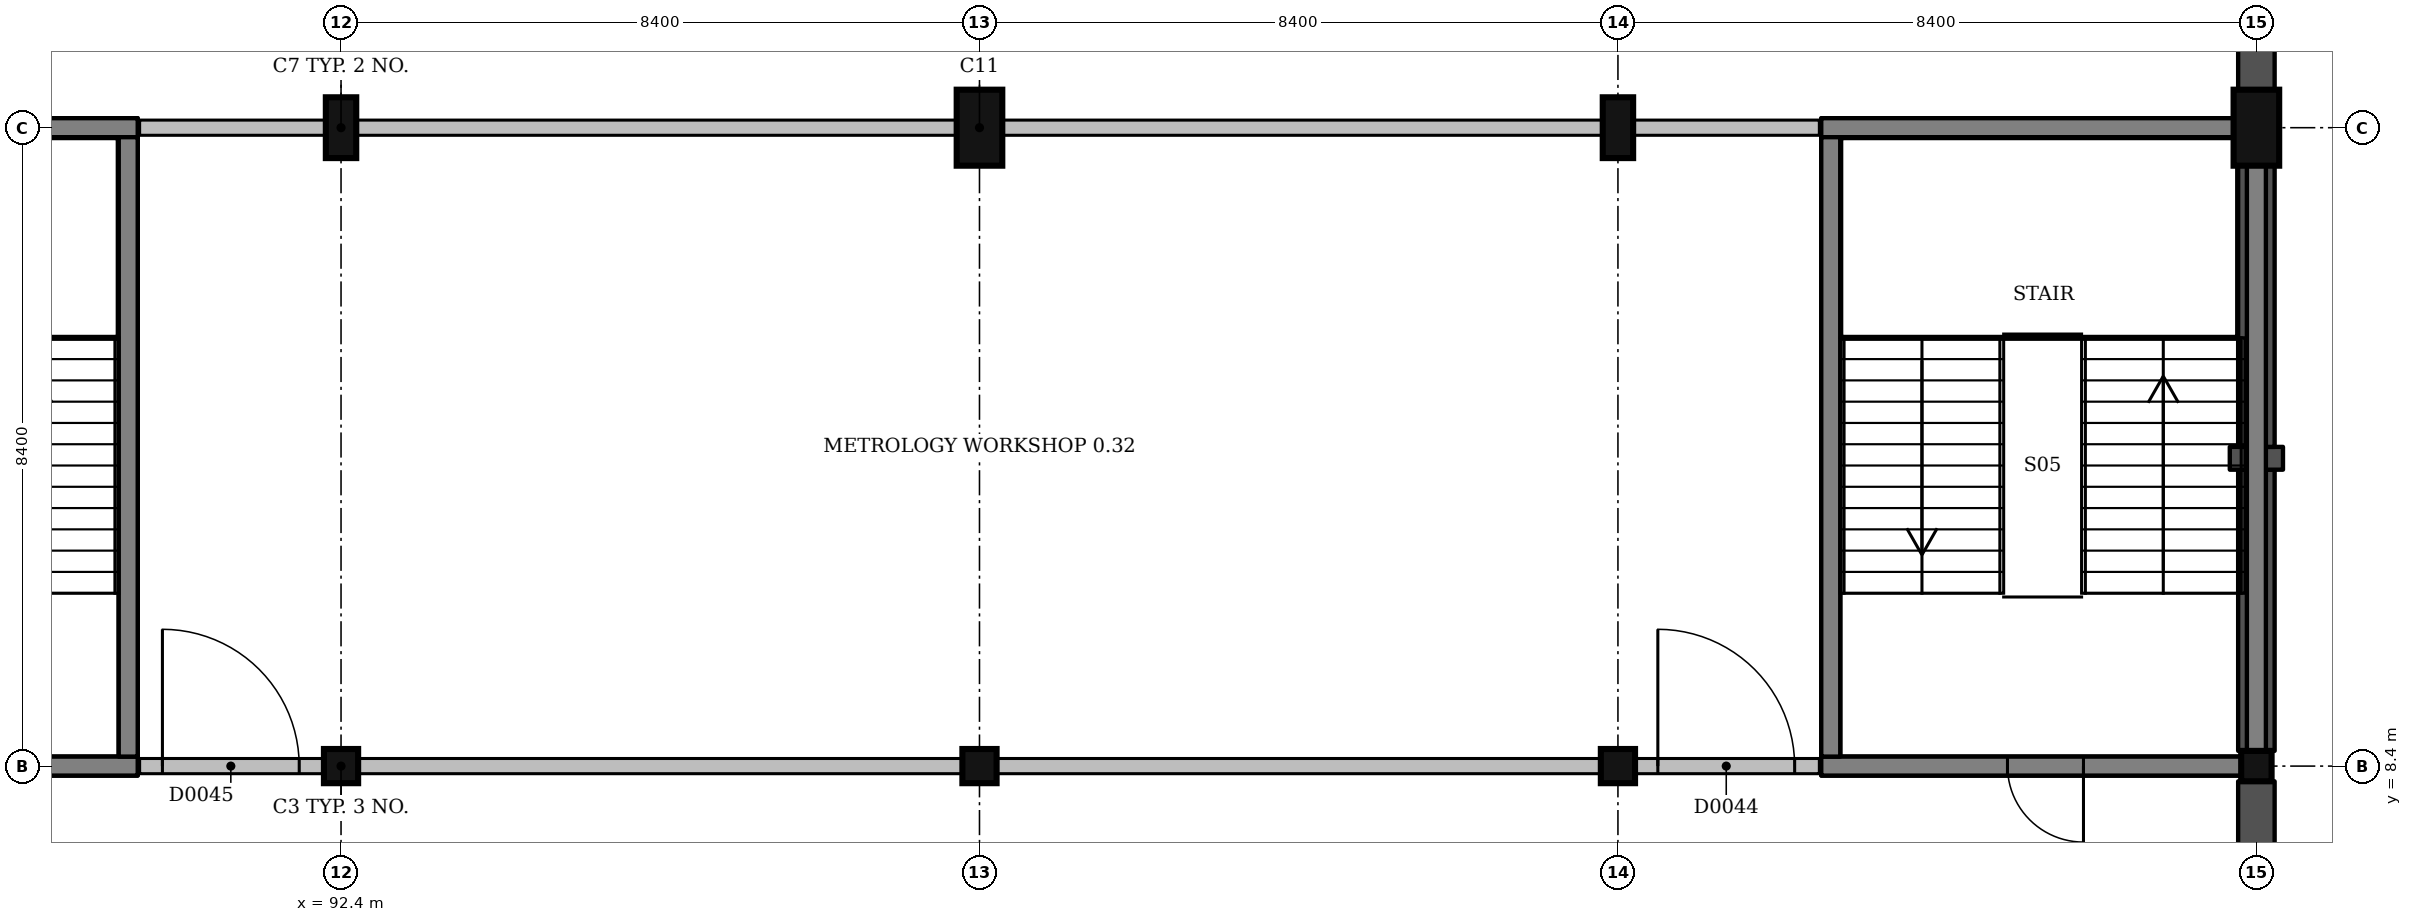
"""IFC4 building model, lengths in metres.
Left out: names, types, materials, properties, quantities, classifications, styles, units other than length and angle.
Written with IfcOpenShell. Run it as: python <this file> out.ifc"""

import sys

from ifc_helpers import new_model, si_unit, direction, frame, frame_2d, origin, origin_2d, place, context, subcontext, project, spatial, rectangle, extrude, element, fill, save


model = new_model("IFC4")
c1 = context("Model", 3, precision=1e-05, world=origin(), true_north=direction((0.0, 1.0)))
c2 = subcontext(c1, "Body", "Model", "MODEL_VIEW")
j1 = project(units=[si_unit("LENGTHUNIT", "METRE"), si_unit("PLANEANGLEUNIT", "RADIAN")], contexts=[c1])
p1 = place(None, origin())
s1 = spatial("IfcSite", under=j1, at=p1, CompositionType="ELEMENT")
p2 = place(p1, origin())
s2 = spatial("IfcBuilding", under=s1, at=p2, CompositionType="ELEMENT")
p3 = place(p2, origin())
s3 = spatial("IfcBuildingStorey", under=s2, at=p3, CompositionType="ELEMENT", Elevation=0.0)
p4 = place(p3, frame((92.4, 8.4, -1.5), z_axis=(0.0, 0.0, 1.0), x_axis=(1.0, 0.0, 0.0)))
e1 = element("IfcColumn", 1, at=p4, inside=s3, PredefinedType="COLUMN", context=c2, shape_type="SweptSolid", body=[
    extrude(rectangle(XDim=0.45, YDim=0.45, at=origin_2d()), origin(), (0.0, 0.0, 1.0), 6.0),
])
p5 = place(p3, frame((92.4, 16.8, -1.5), z_axis=(0.0, 0.0, 1.0), x_axis=(1.0, 0.0, 0.0)))
e2 = element("IfcColumn", 2, at=p5, inside=s3, PredefinedType="COLUMN", context=c2, shape_type="SweptSolid", body=[
    extrude(rectangle(XDim=0.4, YDim=0.8, at=origin_2d()), origin(), (0.0, 0.0, 1.0), 6.0),
])
p6 = place(p3, frame((100.8, 8.4, -1.5), z_axis=(0.0, 0.0, 1.0), x_axis=(1.0, 0.0, 0.0)))
e3 = element("IfcColumn", 3, at=p6, inside=s3, PredefinedType="COLUMN", context=c2, shape_type="SweptSolid", body=[
    extrude(rectangle(XDim=0.45, YDim=0.45, at=origin_2d()), origin(), (0.0, 0.0, 1.0), 6.0),
])
p7 = place(p3, frame((100.8, 16.8, -1.5), z_axis=(0.0, 0.0, 1.0), x_axis=(1.0, 0.0, 0.0)))
e4 = element("IfcColumn", 4, at=p7, inside=s3, PredefinedType="COLUMN", context=c2, shape_type="SweptSolid", body=[
    extrude(rectangle(XDim=0.6, YDim=1.0, at=origin_2d()), origin(), (0.0, 0.0, 1.0), 6.0),
])
p8 = place(p3, frame((109.2, 8.4, -1.5), z_axis=(0.0, 0.0, 1.0), x_axis=(1.0, 0.0, 0.0)))
e5 = element("IfcColumn", 5, at=p8, inside=s3, PredefinedType="COLUMN", context=c2, shape_type="SweptSolid", body=[
    extrude(rectangle(XDim=0.45, YDim=0.45, at=origin_2d()), origin(), (0.0, 0.0, 1.0), 6.0),
])
p9 = place(p3, frame((109.2, 16.8, -1.5), z_axis=(0.0, 0.0, 1.0), x_axis=(1.0, 0.0, 0.0)))
e6 = element("IfcColumn", 6, at=p9, inside=s3, PredefinedType="COLUMN", context=c2, shape_type="SweptSolid", body=[
    extrude(rectangle(XDim=0.4, YDim=0.8, at=origin_2d()), origin(), (0.0, 0.0, 1.0), 6.0),
])
p10 = place(p3, frame((117.6, 8.4, -1.5), z_axis=(0.0, 0.0, 1.0), x_axis=(1.0, 0.0, 0.0)))
e7 = element("IfcColumn", 7, at=p10, inside=s3, PredefinedType="COLUMN", context=c2, shape_type="SweptSolid", body=[
    extrude(rectangle(XDim=0.4, YDim=0.4, at=origin_2d()), origin(), (0.0, 0.0, 1.0), 6.0),
])
p11 = place(p3, frame((117.6, 16.8, -1.5), z_axis=(0.0, 0.0, 1.0), x_axis=(1.0, 0.0, 0.0)))
e8 = element("IfcColumn", 8, at=p11, inside=s3, PredefinedType="COLUMN", context=c2, shape_type="SweptSolid", body=[
    extrude(rectangle(XDim=0.6, YDim=1.0, at=origin_2d()), origin(), (0.0, 0.0, 1.0), 6.0),
])
p12 = place(p3, frame((111.875, 8.4, 0.0), z_axis=(0.0, 0.0, 1.0), x_axis=(1.0, 0.0, 0.0)))
e9 = element("IfcWall", 9, at=p12, inside=s3, PredefinedType="SHEAR", context=c2, shape_type="SweptSolid", body=[
    extrude(rectangle(XDim=5.525, YDim=0.25, at=frame_2d((2.762, 0.0))), origin(), (0.0, 0.0, 1.0), 4.5),
])
p13 = place(p12, frame((2.45, 0.0, 0.0)))
e10 = element("IfcOpeningElement", 10, at=p13, cuts=e9, PredefinedType="OPENING", context=c2, shape_type="SweptSolid", body=[
    extrude(rectangle(XDim=1.0, YDim=2.1, at=frame_2d((0.5, 1.05))), frame((0.0, 0.135, 0.0), z_axis=(0.0, -1.0, 0.0), x_axis=(1.0, 0.0, 0.0)), (0.0, 0.0, 1.0), 0.27),
])
p14 = place(p3, frame((111.875, 16.8, 0.0), z_axis=(0.0, 0.0, 1.0), x_axis=(1.0, 0.0, 0.0)))
e11 = element("IfcWall", 11, at=p14, inside=s3, PredefinedType="SHEAR", context=c2, shape_type="SweptSolid", body=[
    extrude(rectangle(XDim=5.425, YDim=0.25, at=frame_2d((2.712, 0.0))), origin(), (0.0, 0.0, 1.0), 4.5),
])
p15 = place(p3, frame((112.0, 8.525, 0.0), z_axis=(0.0, 0.0, 1.0), x_axis=(0.0, 1.0, 0.0)))
e12 = element("IfcWall", 12, at=p15, inside=s3, PredefinedType="SHEAR", context=c2, shape_type="SweptSolid", body=[
    extrude(rectangle(XDim=8.15, YDim=0.25, at=frame_2d((4.075, 0.0))), origin(), (0.0, 0.0, 1.0), 4.5),
])
p16 = place(p3, frame((84.225, 8.4, 0.0), z_axis=(0.0, 0.0, 1.0), x_axis=(1.0, 0.0, 0.0)))
e13 = element("IfcWall", 13, at=p16, inside=s3, PredefinedType="SHEAR", context=c2, shape_type="SweptSolid", body=[
    extrude(rectangle(XDim=5.5, YDim=0.25, at=frame_2d((2.75, 0.0))), origin(), (0.0, 0.0, 1.0), 4.5),
])
p17 = place(p16, frame((2.05, 0.0, 0.0)))
e14 = element("IfcOpeningElement", 14, at=p17, cuts=e13, PredefinedType="OPENING", context=c2, shape_type="SweptSolid", body=[
    extrude(rectangle(XDim=1.0, YDim=2.1, at=frame_2d((0.5, 1.05))), frame((0.0, 0.135, 0.0), z_axis=(0.0, -1.0, 0.0), x_axis=(1.0, 0.0, 0.0)), (0.0, 0.0, 1.0), 0.27),
])
p18 = place(p3, frame((84.3, 16.8, 0.0), z_axis=(0.0, 0.0, 1.0), x_axis=(1.0, 0.0, 0.0)))
e15 = element("IfcWall", 15, at=p18, inside=s3, PredefinedType="SHEAR", context=c2, shape_type="SweptSolid", body=[
    extrude(rectangle(XDim=5.425, YDim=0.25, at=frame_2d((2.712, 0.0))), origin(), (0.0, 0.0, 1.0), 4.5),
])
p19 = place(p3, frame((89.6, 8.525, 0.0), z_axis=(0.0, 0.0, 1.0), x_axis=(0.0, 1.0, 0.0)))
e16 = element("IfcWall", 16, at=p19, inside=s3, PredefinedType="SHEAR", context=c2, shape_type="SweptSolid", body=[
    extrude(rectangle(XDim=8.15, YDim=0.25, at=frame_2d((4.075, 0.0))), origin(), (0.0, 0.0, 1.0), 4.5),
])
for number, where, z_axis, x_axis in (
    (17, (111.875, 8.4, -1.5), (0.0, 0.0, 1.0), (1.0, 0.0, 0.0)),
    (18, (111.875, 16.8, -1.5), (0.0, 0.0, 1.0), (1.0, 0.0, 0.0)),
):
    element("IfcWall", number, at=place(p3, frame(where, z_axis=z_axis, x_axis=x_axis)), inside=s3, PredefinedType="SHEAR", context=c2, shape_type="SweptSolid", body=[
        extrude(rectangle(XDim=5.85, YDim=0.25, at=frame_2d((2.925, 0.0))), origin(), (0.0, 0.0, 1.0), 1.5),
    ])
for number, where, z_axis, x_axis in (
    (19, (112.0, 8.525, -1.5), (0.0, 0.0, 1.0), (0.0, 1.0, 0.0)),
    (20, (117.6, 8.525, -1.5), (0.0, 0.0, 1.0), (0.0, 1.0, 0.0)),
):
    element("IfcWall", number, at=place(p3, frame(where, z_axis=z_axis, x_axis=x_axis)), inside=s3, PredefinedType="SHEAR", context=c2, shape_type="SweptSolid", body=[
        extrude(rectangle(XDim=8.15, YDim=0.25, at=frame_2d((4.075, 0.0))), origin(), (0.0, 0.0, 1.0), 1.5),
    ])
for number, where, z_axis, x_axis in (
    (21, (83.875, 8.4, -1.5), (0.0, 0.0, 1.0), (1.0, 0.0, 0.0)),
    (22, (83.875, 16.8, -1.5), (0.0, 0.0, 1.0), (1.0, 0.0, 0.0)),
):
    element("IfcWall", number, at=place(p3, frame(where, z_axis=z_axis, x_axis=x_axis)), inside=s3, PredefinedType="SHEAR", context=c2, shape_type="SweptSolid", body=[
        extrude(rectangle(XDim=5.85, YDim=0.25, at=frame_2d((2.925, 0.0))), origin(), (0.0, 0.0, 1.0), 1.5),
    ])
p20 = place(p3, frame((89.6, 8.525, -1.5), z_axis=(0.0, 0.0, 1.0), x_axis=(0.0, 1.0, 0.0)))
e23 = element("IfcWall", 23, at=p20, inside=s3, PredefinedType="SHEAR", context=c2, shape_type="SweptSolid", body=[
    extrude(rectangle(XDim=8.15, YDim=0.25, at=frame_2d((4.075, 0.0))), origin(), (0.0, 0.0, 1.0), 1.5),
])
p21 = place(p3, frame((117.6, 4.35, 0.0), z_axis=(0.0, 0.0, 1.0), x_axis=(0.0, 1.0, 0.0)))
e24 = element("IfcWall", 24, at=p21, inside=s3, PredefinedType="SOLIDWALL", context=c2, shape_type="SweptSolid", body=[
    extrude(rectangle(XDim=3.85, YDim=0.48, at=frame_2d((1.925, 0.0))), origin(), (0.0, 0.0, 1.0), 3.45),
])
p22 = place(p21, frame((2.425, 0.0, 0.0), z_axis=(0.0, 0.0, 1.0), x_axis=(-1.0, 0.0, 0.0)))
e25 = element("IfcOpeningElement", 25, at=p22, cuts=e24, PredefinedType="OPENING", context=c2, shape_type="SweptSolid", body=[
    extrude(rectangle(XDim=1.0, YDim=2.1, at=frame_2d((0.5, 1.05))), frame((0.0, 0.25, 0.0), z_axis=(0.0, -1.0, 0.0), x_axis=(1.0, 0.0, 0.0)), (0.0, 0.0, 1.0), 0.5),
])
p23 = place(p3, frame((117.6, 8.6, 0.0), z_axis=(0.0, 0.0, 1.0), x_axis=(0.0, 1.0, 0.0)))
e26 = element("IfcWall", 26, at=p23, inside=s3, PredefinedType="SOLIDWALL", context=c2, shape_type="SweptSolid", body=[
    extrude(rectangle(XDim=3.7, YDim=0.48, at=frame_2d((1.85, 0.0))), origin(), (0.0, 0.0, 1.0), 3.75),
])
p24 = place(p3, frame((117.6, 12.3, 0.0), z_axis=(0.0, 0.0, 1.0), x_axis=(0.0, 1.0, 0.0)))
e27 = element("IfcWall", 27, at=p24, inside=s3, PredefinedType="SOLIDWALL", context=c2, shape_type="SweptSolid", body=[
    extrude(rectangle(XDim=0.3, YDim=0.7, at=frame_2d((0.15, 0.0))), origin(), (0.0, 0.0, 1.0), 3.75),
])
p25 = place(p3, frame((117.6, 12.6, 0.0), z_axis=(0.0, 0.0, 1.0), x_axis=(0.0, 1.0, 0.0)))
e28 = element("IfcWall", 28, at=p25, inside=s3, PredefinedType="SOLIDWALL", context=c2, shape_type="SweptSolid", body=[
    extrude(rectangle(XDim=3.7, YDim=0.48, at=frame_2d((1.85, 0.0))), origin(), (0.0, 0.0, 1.0), 3.75),
])
p26 = place(p3, frame((117.6, 17.3, 0.0), z_axis=(0.0, 0.0, 1.0), x_axis=(0.0, 1.0, 0.0)))
e29 = element("IfcWall", 29, at=p26, inside=s3, PredefinedType="SOLIDWALL", context=c2, shape_type="SweptSolid", body=[
    extrude(rectangle(XDim=3.675, YDim=0.48, at=frame_2d((1.837, 0.0))), origin(), (0.0, 0.0, 1.0), 3.75),
])
p27 = place(p26, frame((0.938, 0.0, 0.0)))
e30 = element("IfcOpeningElement", 30, at=p27, cuts=e29, PredefinedType="OPENING", context=c2, shape_type="SweptSolid", body=[
    extrude(rectangle(XDim=1.8, YDim=2.1, at=frame_2d((0.9, 1.05))), frame((0.0, 0.25, 0.0), z_axis=(0.0, -1.0, 0.0), x_axis=(1.0, 0.0, 0.0)), (0.0, 0.0, 1.0), 0.5),
])
p28 = place(p3, frame((89.75, 8.4, 0.0), z_axis=(0.0, 0.0, 1.0), x_axis=(1.0, 0.0, 0.0)))
e31 = element("IfcWall", 31, at=p28, inside=s3, PredefinedType="PARTITIONING", context=c2, shape_type="SweptSolid", body=[
    extrude(rectangle(XDim=2.425, YDim=0.2, at=frame_2d((1.212, 0.0))), origin(), (0.0, 0.0, 1.0), 3.6),
])
p29 = place(p28, frame((0.3, 0.0, 0.0)))
e32 = element("IfcOpeningElement", 32, at=p29, cuts=e31, PredefinedType="OPENING", context=c2, shape_type="SweptSolid", body=[
    extrude(rectangle(XDim=1.8, YDim=2.1, at=frame_2d((0.9, 1.05))), frame((0.0, 0.11, 0.0), z_axis=(0.0, -1.0, 0.0), x_axis=(1.0, 0.0, 0.0)), (0.0, 0.0, 1.0), 0.22),
])
p30 = place(p3, frame((92.625, 8.4, 0.0), z_axis=(0.0, 0.0, 1.0), x_axis=(1.0, 0.0, 0.0)))
e33 = element("IfcWall", 33, at=p30, inside=s3, PredefinedType="PARTITIONING", context=c2, shape_type="SweptSolid", body=[
    extrude(rectangle(XDim=7.95, YDim=0.2, at=frame_2d((3.975, 0.0))), origin(), (0.0, 0.0, 1.0), 3.5),
])
p31 = place(p3, frame((101.025, 8.4, 0.0), z_axis=(0.0, 0.0, 1.0), x_axis=(1.0, 0.0, 0.0)))
e34 = element("IfcWall", 34, at=p31, inside=s3, PredefinedType="PARTITIONING", context=c2, shape_type="SweptSolid", body=[
    extrude(rectangle(XDim=7.95, YDim=0.2, at=frame_2d((3.975, 0.0))), origin(), (0.0, 0.0, 1.0), 3.5),
])
p32 = place(p3, frame((109.425, 8.4, 0.0), z_axis=(0.0, 0.0, 1.0), x_axis=(1.0, 0.0, 0.0)))
e35 = element("IfcWall", 35, at=p32, inside=s3, PredefinedType="PARTITIONING", context=c2, shape_type="SweptSolid", body=[
    extrude(rectangle(XDim=2.425, YDim=0.2, at=frame_2d((1.212, 0.0))), origin(), (0.0, 0.0, 1.0), 3.6),
])
p33 = place(p32, frame((0.3, 0.0, 0.0)))
e36 = element("IfcOpeningElement", 36, at=p33, cuts=e35, PredefinedType="OPENING", context=c2, shape_type="SweptSolid", body=[
    extrude(rectangle(XDim=1.8, YDim=2.1, at=frame_2d((0.9, 1.05))), frame((0.0, 0.11, 0.0), z_axis=(0.0, -1.0, 0.0), x_axis=(1.0, 0.0, 0.0)), (0.0, 0.0, 1.0), 0.22),
])
p34 = place(p3, frame((89.75, 16.8, 0.0), z_axis=(0.0, 0.0, 1.0), x_axis=(1.0, 0.0, 0.0)))
e37 = element("IfcWall", 37, at=p34, inside=s3, PredefinedType="PARTITIONING", context=c2, shape_type="SweptSolid", body=[
    extrude(rectangle(XDim=2.45, YDim=0.2, at=frame_2d((1.225, 0.0))), origin(), (0.0, 0.0, 1.0), 3.45),
])
for number, where, z_axis, x_axis in (
    (38, (92.6, 16.8, 0.0), (0.0, 0.0, 1.0), (1.0, 0.0, 0.0)),
    (39, (101.1, 16.8, 0.0), (0.0, 0.0, 1.0), (1.0, 0.0, 0.0)),
):
    element("IfcWall", number, at=place(p3, frame(where, z_axis=z_axis, x_axis=x_axis)), inside=s3, PredefinedType="PARTITIONING", context=c2, shape_type="SweptSolid", body=[
        extrude(rectangle(XDim=7.9, YDim=0.2, at=frame_2d((3.95, 0.0))), origin(), (0.0, 0.0, 1.0), 3.45),
    ])
p35 = place(p3, frame((109.4, 16.8, 0.0), z_axis=(0.0, 0.0, 1.0), x_axis=(1.0, 0.0, 0.0)))
e40 = element("IfcWall", 40, at=p35, inside=s3, PredefinedType="PARTITIONING", context=c2, shape_type="SweptSolid", body=[
    extrude(rectangle(XDim=2.45, YDim=0.2, at=frame_2d((1.225, 0.0))), origin(), (0.0, 0.0, 1.0), 3.45),
])
p36 = place(p33, origin())
e41 = element("IfcDoor", 41, at=p36, inside=s3, OperationType="DOUBLE_DOOR_SINGLE_SWING", PredefinedType="DOOR", context=c2, shape_type="SweptSolid", body=[
    extrude(rectangle(XDim=1.8, YDim=2.1, at=frame_2d((0.9, 1.05))), frame((0.0, 0.025, 0.0), z_axis=(0.0, -1.0, 0.0), x_axis=(1.0, 0.0, 0.0)), (0.0, 0.0, 1.0), 0.05),
])
fill(e36, e41)
p37 = place(p29, origin())
e42 = element("IfcDoor", 42, at=p37, inside=s3, OperationType="DOUBLE_DOOR_SINGLE_SWING", PredefinedType="DOOR", context=c2, shape_type="SweptSolid", body=[
    extrude(rectangle(XDim=1.8, YDim=2.1, at=frame_2d((0.9, 1.05))), frame((0.0, 0.025, 0.0), z_axis=(0.0, -1.0, 0.0), x_axis=(1.0, 0.0, 0.0)), (0.0, 0.0, 1.0), 0.05),
])
fill(e32, e42)
p38 = place(p13, origin())
e43 = element("IfcDoor", 43, at=p38, inside=s3, OperationType="SINGLE_SWING_RIGHT", PredefinedType="DOOR", context=c2, shape_type="SweptSolid", body=[
    extrude(rectangle(XDim=1.0, YDim=2.1, at=frame_2d((0.5, 1.05))), frame((0.0, 0.025, 0.0), z_axis=(0.0, -1.0, 0.0), x_axis=(1.0, 0.0, 0.0)), (0.0, 0.0, 1.0), 0.05),
])
fill(e10, e43)
save(model, sys.argv[1])
